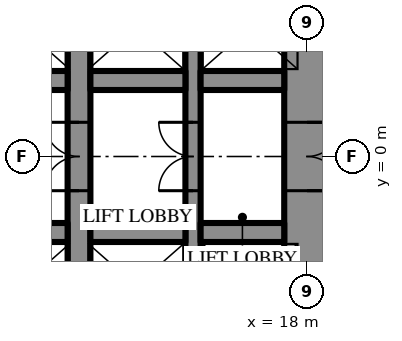
"""IFC4 building model, lengths in metres.
Left out: names, types, materials, properties, quantities, classifications, styles, units other than length and angle.
Written with IfcOpenShell. Run it as: python <this file> out.ifc"""

import sys

from ifc_helpers import new_model, si_unit, direction, frame, frame_2d, origin, place, context, subcontext, project, spatial, rectangle, extrude, element, fill, save


model = new_model("IFC4")
c1 = context("Model", 3, precision=1e-05, world=origin(), true_north=direction((0.0, 1.0)))
c2 = subcontext(c1, "Body", "Model", "MODEL_VIEW")
j1 = project(units=[si_unit("LENGTHUNIT", "METRE"), si_unit("PLANEANGLEUNIT", "RADIAN")], contexts=[c1])
p1 = place(None, origin())
s1 = spatial("IfcSite", under=j1, at=p1, CompositionType="ELEMENT")
p2 = place(p1, origin())
s2 = spatial("IfcBuilding", under=s1, at=p2, CompositionType="ELEMENT")
p3 = place(p2, frame((0.0, 0.0, 57.1)))
s3 = spatial("IfcBuildingStorey", under=s2, at=p3, CompositionType="ELEMENT", Elevation=57.1)
p4 = place(p3, frame((18.0, -10.7, 0.0), z_axis=(0.0, 0.0, 1.0), x_axis=(0.0, 1.0, 0.0)))
e1 = element("IfcWall", 1, at=p4, inside=s3, PredefinedType="SHEAR", context=c2, shape_type="SweptSolid", body=[
    extrude(rectangle(XDim=21.4, YDim=1.2, at=frame_2d((10.7, 0.0))), origin(), (0.0, 0.0, 1.0), 4.2),
])
p5 = place(p4, frame((9.8, 0.0, 0.0)))
e2 = element("IfcOpeningElement", 2, at=p5, cuts=e1, PredefinedType="OPENING", context=c2, shape_type="SweptSolid", body=[
    extrude(rectangle(XDim=1.8, YDim=2.4, at=frame_2d((0.9, 1.2))), frame((0.0, 0.61, 0.0), z_axis=(0.0, -1.0, 0.0), x_axis=(1.0, 0.0, 0.0)), (0.0, 0.0, 1.0), 1.22),
])
p6 = place(p3, frame((12.0, -10.7, 0.0), z_axis=(0.0, 0.0, 1.0), x_axis=(0.0, 1.0, 0.0)))
e3 = element("IfcWall", 3, at=p6, inside=s3, PredefinedType="SHEAR", context=c2, shape_type="SweptSolid", body=[
    extrude(rectangle(XDim=21.4, YDim=0.6, at=frame_2d((10.7, 0.0))), origin(), (0.0, 0.0, 1.0), 4.2),
])
p7 = place(p6, frame((9.8, 0.0, 0.0)))
e4 = element("IfcOpeningElement", 4, at=p7, cuts=e3, PredefinedType="OPENING", context=c2, shape_type="SweptSolid", body=[
    extrude(rectangle(XDim=1.8, YDim=2.4, at=frame_2d((0.9, 1.2))), frame((0.0, 0.31, 0.0), z_axis=(0.0, -1.0, 0.0), x_axis=(1.0, 0.0, 0.0)), (0.0, 0.0, 1.0), 0.62),
])
p8 = place(p3, frame((15.0, -10.7, 0.0), z_axis=(0.0, 0.0, 1.0), x_axis=(0.0, 1.0, 0.0)))
e5 = element("IfcWall", 5, at=p8, inside=s3, PredefinedType="SHEAR", context=c2, shape_type="SweptSolid", body=[
    extrude(rectangle(XDim=21.4, YDim=0.4, at=frame_2d((10.7, 0.0))), origin(), (0.0, 0.0, 1.0), 4.2),
])
p9 = place(p8, frame((9.8, 0.0, 0.0)))
e6 = element("IfcOpeningElement", 6, at=p9, cuts=e5, PredefinedType="OPENING", context=c2, shape_type="SweptSolid", body=[
    extrude(rectangle(XDim=1.8, YDim=2.4, at=frame_2d((0.9, 1.2))), frame((0.0, 0.21, 0.0), z_axis=(0.0, -1.0, 0.0), x_axis=(1.0, 0.0, 0.0)), (0.0, 0.0, 1.0), 0.42),
])
p10 = place(p3, frame((-3.2, 2.0, 0.0), z_axis=(0.0, 0.0, 1.0), x_axis=(1.0, 0.0, 0.0)))
e7 = element("IfcWall", 7, at=p10, inside=s3, PredefinedType="SHEAR", context=c2, shape_type="SweptSolid", body=[
    extrude(rectangle(XDim=14.9, YDim=0.5, at=frame_2d((7.45, 0.0))), origin(), (0.0, 0.0, 1.0), 4.2),
])
p11 = place(p10, frame((1.15, 0.0, 0.0)))
e8 = element("IfcOpeningElement", 8, at=p11, cuts=e7, PredefinedType="OPENING", context=c2, shape_type="SweptSolid", body=[
    extrude(rectangle(XDim=1.1, YDim=2.2, at=frame_2d((0.55, 1.1))), frame((0.0, 0.26, 0.0), z_axis=(0.0, -1.0, 0.0), x_axis=(1.0, 0.0, 0.0)), (0.0, 0.0, 1.0), 0.52),
])
p12 = place(p10, frame((4.15, 0.0, 0.0)))
e9 = element("IfcOpeningElement", 9, at=p12, cuts=e7, PredefinedType="OPENING", context=c2, shape_type="SweptSolid", body=[
    extrude(rectangle(XDim=1.1, YDim=2.2, at=frame_2d((0.55, 1.1))), frame((0.0, 0.26, 0.0), z_axis=(0.0, -1.0, 0.0), x_axis=(1.0, 0.0, 0.0)), (0.0, 0.0, 1.0), 0.52),
])
p13 = place(p10, frame((7.15, 0.0, 0.0)))
e10 = element("IfcOpeningElement", 10, at=p13, cuts=e7, PredefinedType="OPENING", context=c2, shape_type="SweptSolid", body=[
    extrude(rectangle(XDim=1.1, YDim=2.2, at=frame_2d((0.55, 1.1))), frame((0.0, 0.26, 0.0), z_axis=(0.0, -1.0, 0.0), x_axis=(1.0, 0.0, 0.0)), (0.0, 0.0, 1.0), 0.52),
])
p14 = place(p10, frame((10.15, 0.0, 0.0)))
e11 = element("IfcOpeningElement", 11, at=p14, cuts=e7, PredefinedType="OPENING", context=c2, shape_type="SweptSolid", body=[
    extrude(rectangle(XDim=1.1, YDim=2.2, at=frame_2d((0.55, 1.1))), frame((0.0, 0.26, 0.0), z_axis=(0.0, -1.0, 0.0), x_axis=(1.0, 0.0, 0.0)), (0.0, 0.0, 1.0), 0.52),
])
p15 = place(p3, frame((12.3, 2.0, 0.0), z_axis=(0.0, 0.0, 1.0), x_axis=(1.0, 0.0, 0.0)))
e12 = element("IfcWall", 12, at=p15, inside=s3, PredefinedType="SHEAR", context=c2, shape_type="SweptSolid", body=[
    extrude(rectangle(XDim=2.5, YDim=0.5, at=frame_2d((1.25, 0.0))), origin(), (0.0, 0.0, 1.0), 4.2),
])
for number, where, z_axis, x_axis in (
    (13, (15.2, 2.0, 0.0), (0.0, 0.0, 1.0), (1.0, 0.0, 0.0)),
    (14, (17.4, -2.0, 0.0), (0.0, 0.0, 1.0), (-1.0, 0.0, 0.0)),
):
    element("IfcWall", number, at=place(p3, frame(where, z_axis=z_axis, x_axis=x_axis)), inside=s3, PredefinedType="SHEAR", context=c2, shape_type="SweptSolid", body=[
        extrude(rectangle(XDim=2.2, YDim=0.5, at=frame_2d((1.1, 0.0))), origin(), (0.0, 0.0, 1.0), 4.2),
    ])
p16 = place(p3, frame((14.8, -2.0, 0.0), z_axis=(0.0, 0.0, 1.0), x_axis=(-1.0, 0.0, 0.0)))
e15 = element("IfcWall", 15, at=p16, inside=s3, PredefinedType="SHEAR", context=c2, shape_type="SweptSolid", body=[
    extrude(rectangle(XDim=2.5, YDim=0.5, at=frame_2d((1.25, 0.0))), origin(), (0.0, 0.0, 1.0), 4.2),
])
p17 = place(p3, frame((11.7, -2.0, 0.0), z_axis=(0.0, 0.0, 1.0), x_axis=(-1.0, 0.0, 0.0)))
e16 = element("IfcWall", 16, at=p17, inside=s3, PredefinedType="SHEAR", context=c2, shape_type="SweptSolid", body=[
    extrude(rectangle(XDim=5.9, YDim=0.5, at=frame_2d((2.95, 0.0))), origin(), (0.0, 0.0, 1.0), 4.2),
])
p18 = place(p5, frame((1.8, 0.0, 0.0), z_axis=(0.0, 0.0, 1.0), x_axis=(-1.0, 0.0, 0.0)))
e17 = element("IfcDoor", 17, at=p18, inside=s3, OperationType="DOUBLE_DOOR_SINGLE_SWING", PredefinedType="DOOR", context=c2, shape_type="SweptSolid", body=[
    extrude(rectangle(XDim=1.8, YDim=2.4, at=frame_2d((0.9, 1.2))), frame((0.0, 0.025, 0.0), z_axis=(0.0, -1.0, 0.0), x_axis=(1.0, 0.0, 0.0)), (0.0, 0.0, 1.0), 0.05),
])
fill(e2, e17)
p19 = place(p7, origin())
e18 = element("IfcDoor", 18, at=p19, inside=s3, OperationType="DOUBLE_DOOR_SINGLE_SWING", PredefinedType="DOOR", context=c2, shape_type="SweptSolid", body=[
    extrude(rectangle(XDim=1.8, YDim=2.4, at=frame_2d((0.9, 1.2))), frame((0.0, 0.025, 0.0), z_axis=(0.0, -1.0, 0.0), x_axis=(1.0, 0.0, 0.0)), (0.0, 0.0, 1.0), 0.05),
])
fill(e4, e18)
p20 = place(p9, origin())
e19 = element("IfcDoor", 19, at=p20, inside=s3, OperationType="DOUBLE_DOOR_SINGLE_SWING", PredefinedType="DOOR", context=c2, shape_type="SweptSolid", body=[
    extrude(rectangle(XDim=1.8, YDim=2.4, at=frame_2d((0.9, 1.2))), frame((0.0, 0.025, 0.0), z_axis=(0.0, -1.0, 0.0), x_axis=(1.0, 0.0, 0.0)), (0.0, 0.0, 1.0), 0.05),
])
fill(e6, e19)
save(model, sys.argv[1])
